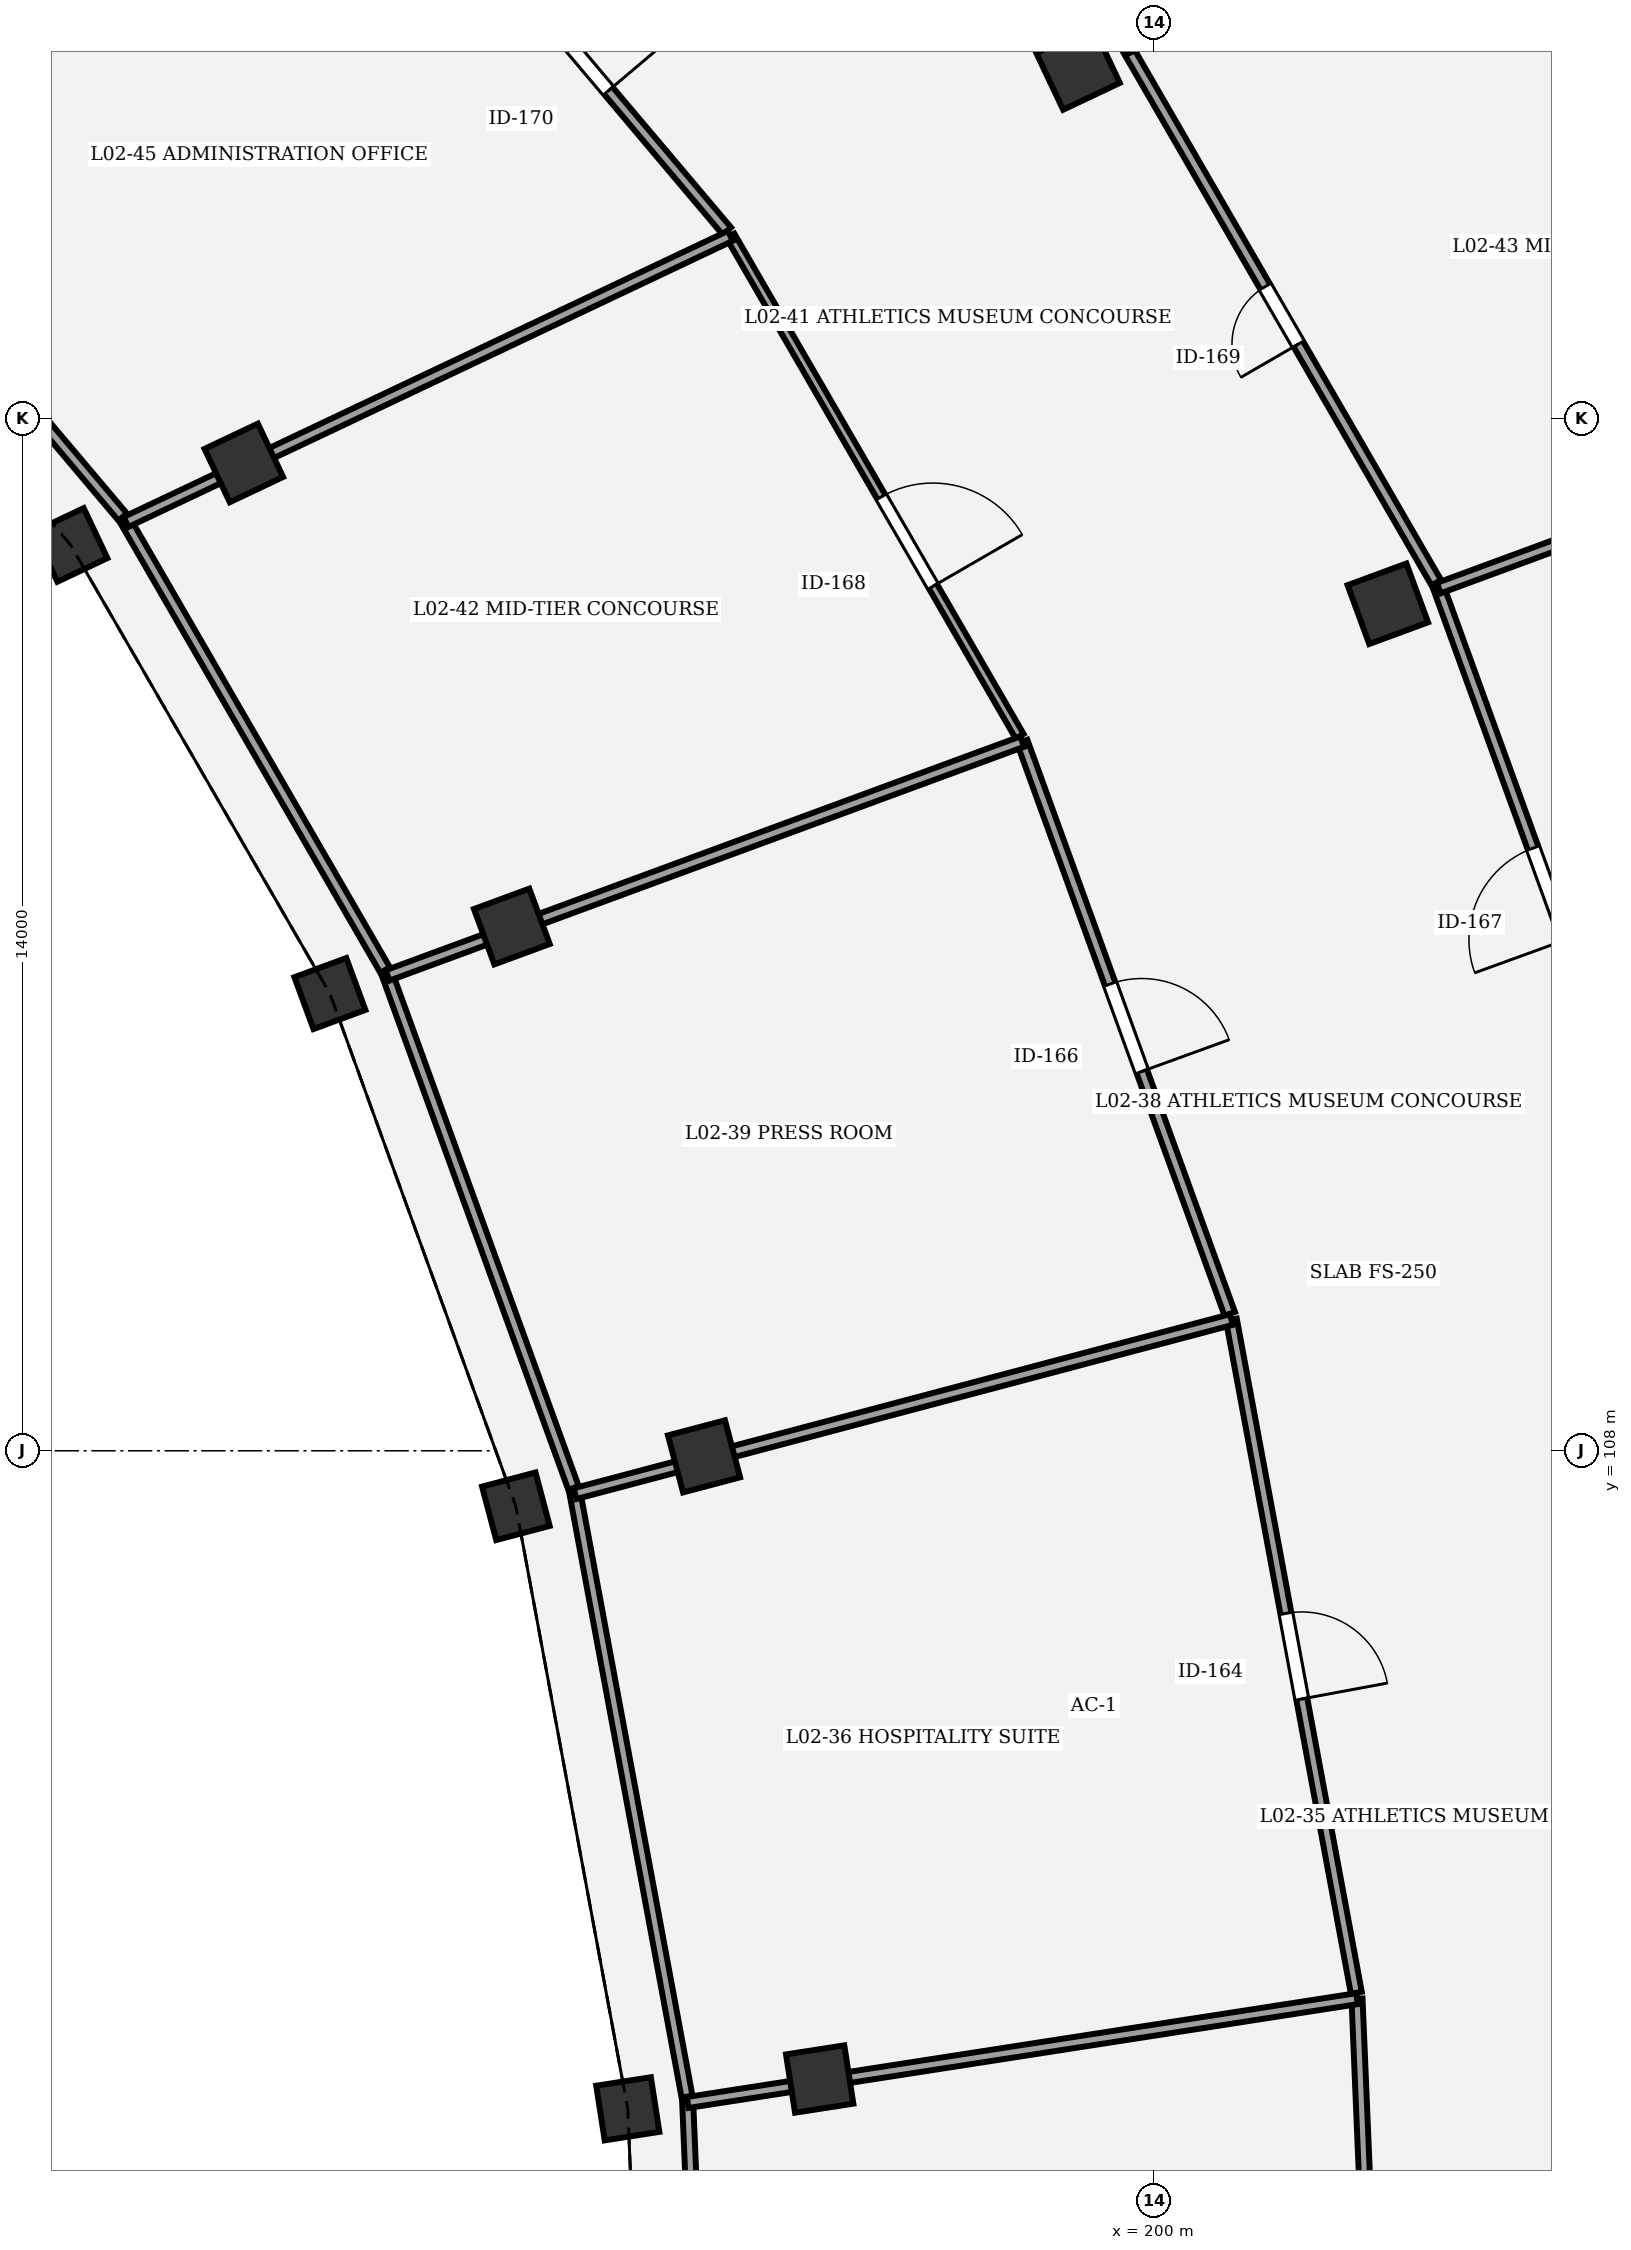
"""IFC4 building model, lengths in metres.
Left out: names, types, materials, properties, quantities, classifications, styles, units other than length and angle.
Written with IfcOpenShell. Run it as: python <this file> out.ifc"""

import sys

from ifc_helpers import new_model, si_unit, direction, frame, frame_2d, origin, origin_2d, place, context, subcontext, project, spatial, rectangle, extrude, element, fill, save


model = new_model("IFC4")
c1 = context("Model", 3, precision=1e-05, world=origin(), true_north=direction((0.0, 1.0)))
c2 = subcontext(c1, "Body", "Model", "MODEL_VIEW")
j1 = project(units=[si_unit("LENGTHUNIT", "METRE"), si_unit("PLANEANGLEUNIT", "RADIAN")], contexts=[c1])
p1 = place(None, origin())
s1 = spatial("IfcSite", under=j1, at=p1, CompositionType="ELEMENT")
p2 = place(p1, origin())
s2 = spatial("IfcBuilding", under=s1, at=p2, CompositionType="ELEMENT")
p3 = place(p2, frame((0.0, 0.0, 10.2)))
s3 = spatial("IfcBuildingStorey", under=s2, at=p3, CompositionType="ELEMENT", Elevation=10.2)
p4 = place(p3, frame((192.869, 99.078, 0.0), z_axis=(0.0, 0.0, 1.0), x_axis=(0.98817491911, 0.153330783737, 0.0)))
e1 = element("IfcColumn", 1, at=p4, inside=s3, PredefinedType="COLUMN", context=c2, shape_type="SweptSolid", body=[
    extrude(rectangle(XDim=0.75, YDim=0.75, at=origin_2d()), origin(), (0.0, 0.0, 1.0), 4.5),
])
p5 = place(p3, frame((195.471, 99.482, 0.0), z_axis=(0.0, 0.0, 1.0), x_axis=(0.98817491911, 0.153330783737, 0.0)))
e2 = element("IfcColumn", 2, at=p5, inside=s3, PredefinedType="COLUMN", context=c2, shape_type="SweptSolid", body=[
    extrude(rectangle(XDim=0.8, YDim=0.8, at=origin_2d()), origin(), (0.0, 0.0, 1.0), 4.5),
])
p6 = place(p3, frame((191.352, 107.248, 0.0), z_axis=(0.0, 0.0, 1.0), x_axis=(0.966600102017, 0.256289373133, 0.0)))
e3 = element("IfcColumn", 3, at=p6, inside=s3, PredefinedType="COLUMN", context=c2, shape_type="SweptSolid", body=[
    extrude(rectangle(XDim=0.75, YDim=0.75, at=origin_2d()), origin(), (0.0, 0.0, 1.0), 4.5),
])
p7 = place(p3, frame((193.903, 107.924, 0.0), z_axis=(0.0, 0.0, 1.0), x_axis=(0.966600102017, 0.256289373133, 0.0)))
e4 = element("IfcColumn", 4, at=p7, inside=s3, PredefinedType="COLUMN", context=c2, shape_type="SweptSolid", body=[
    extrude(rectangle(XDim=0.8, YDim=0.8, at=origin_2d()), origin(), (0.0, 0.0, 1.0), 4.5),
])
p8 = place(p3, frame((188.83, 114.199, 0.0), z_axis=(0.0, 0.0, 1.0), x_axis=(0.938372433776, 0.34562577382, 0.0)))
e5 = element("IfcColumn", 5, at=p8, inside=s3, PredefinedType="COLUMN", context=c2, shape_type="SweptSolid", body=[
    extrude(rectangle(XDim=0.75, YDim=0.75, at=origin_2d()), origin(), (0.0, 0.0, 1.0), 4.5),
])
p9 = place(p3, frame((191.297, 115.108, 0.0), z_axis=(0.0, 0.0, 1.0), x_axis=(0.938372433776, 0.34562577382, 0.0)))
e6 = element("IfcColumn", 6, at=p9, inside=s3, PredefinedType="COLUMN", context=c2, shape_type="SweptSolid", body=[
    extrude(rectangle(XDim=0.8, YDim=0.8, at=origin_2d()), origin(), (0.0, 0.0, 1.0), 4.5),
])
p10 = place(p3, frame((203.176, 119.484, 0.0), z_axis=(0.0, 0.0, 1.0), x_axis=(0.938372433776, 0.34562577382, 0.0)))
e7 = element("IfcColumn", 7, at=p10, inside=s3, PredefinedType="COLUMN", context=c2, shape_type="SweptSolid", body=[
    extrude(rectangle(XDim=0.85, YDim=0.85, at=origin_2d()), origin(), (0.0, 0.0, 1.0), 4.5),
])
p11 = place(p3, frame((185.313, 120.281, 0.0), z_axis=(0.0, 0.0, 1.0), x_axis=(0.903858661687, 0.4278311813, 0.0)))
e8 = element("IfcColumn", 8, at=p11, inside=s3, PredefinedType="COLUMN", context=c2, shape_type="SweptSolid", body=[
    extrude(rectangle(XDim=0.75, YDim=0.75, at=origin_2d()), origin(), (0.0, 0.0, 1.0), 4.5),
])
p12 = place(p3, frame((187.663, 121.394, 0.0), z_axis=(0.0, 0.0, 1.0), x_axis=(0.903858661687, 0.4278311813, 0.0)))
e9 = element("IfcColumn", 9, at=p12, inside=s3, PredefinedType="COLUMN", context=c2, shape_type="SweptSolid", body=[
    extrude(rectangle(XDim=0.8, YDim=0.8, at=origin_2d()), origin(), (0.0, 0.0, 1.0), 4.5),
])
p13 = place(p3, frame((198.976, 126.748, 0.0), z_axis=(0.0, 0.0, 1.0), x_axis=(0.903858661687, 0.4278311813, 0.0)))
e10 = element("IfcColumn", 10, at=p13, inside=s3, PredefinedType="COLUMN", context=c2, shape_type="SweptSolid", body=[
    extrude(rectangle(XDim=0.85, YDim=0.85, at=origin_2d()), origin(), (0.0, 0.0, 1.0), 4.5),
])
p14 = place(p3, frame((202.758, 100.571, 0.0), z_axis=(0.0, 0.0, 1.0), x_axis=(0.041894479342, -0.999122040894, 0.0)))
e11 = element("IfcWall", 11, at=p14, inside=s3, PredefinedType="PARTITIONING", context=c2, shape_type="SweptSolid", body=[
    extrude(rectangle(XDim=13.543, YDim=0.15, at=frame_2d((6.771, 0.0))), origin(), (0.0, 0.0, 1.0), 3.25),
])
p15 = place(p14, frame((6.202, 0.0, 0.0)))
e12 = element("IfcOpeningElement", 12, at=p15, cuts=e11, PredefinedType="OPENING", context=c2, shape_type="SweptSolid", body=[
    extrude(rectangle(XDim=1.14, YDim=2.2, at=frame_2d((0.57, 1.1))), frame((0.0, 0.085, 0.0), z_axis=(0.0, -1.0, 0.0), x_axis=(1.0, 0.0, 0.0)), (0.0, 0.0, 1.0), 0.17),
])
p16 = place(p3, frame((201.053, 109.779, 0.0), z_axis=(0.0, 0.0, 1.0), x_axis=(0.182600545941, -0.983187184936, 0.0)))
e13 = element("IfcWall", 13, at=p16, inside=s3, PredefinedType="PARTITIONING", context=c2, shape_type="SweptSolid", body=[
    extrude(rectangle(XDim=9.284, YDim=0.15, at=frame_2d((4.642, 0.0))), origin(), (0.0, 0.0, 1.0), 3.25),
])
p17 = place(p16, frame((4.052, 0.0, 0.0)))
e14 = element("IfcOpeningElement", 14, at=p17, cuts=e13, PredefinedType="OPENING", context=c2, shape_type="SweptSolid", body=[
    extrude(rectangle(XDim=1.18, YDim=2.2, at=frame_2d((0.59, 1.1))), frame((0.0, 0.085, 0.0), z_axis=(0.0, -1.0, 0.0), x_axis=(1.0, 0.0, 0.0)), (0.0, 0.0, 1.0), 0.17),
])
p18 = place(p3, frame((198.218, 117.615, 0.0), z_axis=(0.0, 0.0, 1.0), x_axis=(0.341044733968, -0.940047067669, 0.0)))
e15 = element("IfcWall", 15, at=p18, inside=s3, PredefinedType="PARTITIONING", context=c2, shape_type="SweptSolid", body=[
    extrude(rectangle(XDim=8.254, YDim=0.15, at=frame_2d((4.127, 0.0))), origin(), (0.0, 0.0, 1.0), 3.25),
])
p19 = place(p18, frame((3.497, 0.0, 0.0)))
e16 = element("IfcOpeningElement", 16, at=p19, cuts=e15, PredefinedType="OPENING", context=c2, shape_type="SweptSolid", body=[
    extrude(rectangle(XDim=1.26, YDim=2.2, at=frame_2d((0.63, 1.1))), frame((0.0, 0.085, 0.0), z_axis=(0.0, -1.0, 0.0), x_axis=(1.0, 0.0, 0.0)), (0.0, 0.0, 1.0), 0.17),
])
p20 = place(p3, frame((206.874, 111.405, 0.0), z_axis=(0.0, 0.0, 1.0), x_axis=(-0.341031741571, 0.940051781149, 0.0)))
e17 = element("IfcWall", 17, at=p20, inside=s3, PredefinedType="PARTITIONING", context=c2, shape_type="SweptSolid", body=[
    extrude(rectangle(XDim=8.82, YDim=0.15, at=frame_2d((4.41, 0.0))), origin(), (0.0, 0.0, 1.0), 3.25),
])
p21 = place(p20, frame((3.75, 0.0, 0.0)))
e18 = element("IfcOpeningElement", 18, at=p21, cuts=e17, PredefinedType="OPENING", context=c2, shape_type="SweptSolid", body=[
    extrude(rectangle(XDim=1.32, YDim=2.2, at=frame_2d((0.66, 1.1))), frame((0.0, 0.085, 0.0), z_axis=(0.0, -1.0, 0.0), x_axis=(1.0, 0.0, 0.0)), (0.0, 0.0, 1.0), 0.17),
])
p22 = place(p3, frame((194.26, 124.472, 0.0), z_axis=(0.0, 0.0, 1.0), x_axis=(0.500584301803, -0.865687794063, 0.0)))
e19 = element("IfcWall", 19, at=p22, inside=s3, PredefinedType="PARTITIONING", context=c2, shape_type="SweptSolid", body=[
    extrude(rectangle(XDim=7.837, YDim=0.125, at=frame_2d((3.918, 0.0))), origin(), (0.0, 0.0, 1.0), 3.25),
])
p23 = place(p22, frame((4.088, 0.0, 0.0)))
e20 = element("IfcOpeningElement", 20, at=p23, cuts=e19, PredefinedType="OPENING", context=c2, shape_type="SweptSolid", body=[
    extrude(rectangle(XDim=1.4, YDim=2.2, at=frame_2d((0.7, 1.1))), frame((0.0, 0.073, 0.0), z_axis=(0.0, -1.0, 0.0), x_axis=(1.0, 0.0, 0.0)), (0.0, 0.0, 1.0), 0.145),
])
p24 = place(p3, frame((203.833, 119.769, 0.0), z_axis=(0.0, 0.0, 1.0), x_axis=(-0.500559280672, 0.865702262059, 0.0)))
e21 = element("IfcWall", 21, at=p24, inside=s3, PredefinedType="PARTITIONING", context=c2, shape_type="SweptSolid", body=[
    extrude(rectangle(XDim=8.375, YDim=0.15, at=frame_2d((4.187, 0.0))), origin(), (0.0, 0.0, 1.0), 3.25),
])
p25 = place(p24, frame((3.737, 0.0, 0.0)))
e22 = element("IfcOpeningElement", 22, at=p25, cuts=e21, PredefinedType="OPENING", context=c2, shape_type="SweptSolid", body=[
    extrude(rectangle(XDim=0.9, YDim=2.3, at=frame_2d((0.45, 1.15))), frame((0.0, 0.085, 0.0), z_axis=(0.0, -1.0, 0.0), x_axis=(1.0, 0.0, 0.0)), (0.0, 0.0, 1.0), 0.17),
])
p26 = place(p3, frame((189.193, 130.482, 0.0), z_axis=(0.0, 0.0, 1.0), x_axis=(0.645180817826, -0.764029915847, 0.0)))
e23 = element("IfcWall", 23, at=p26, inside=s3, PredefinedType="PARTITIONING", context=c2, shape_type="SweptSolid", body=[
    extrude(rectangle(XDim=7.779, YDim=0.15, at=frame_2d((3.89, 0.0))), origin(), (0.0, 0.0, 1.0), 3.25),
])
p27 = place(p26, frame((4.35, 0.0, 0.0)))
e24 = element("IfcOpeningElement", 24, at=p27, cuts=e23, PredefinedType="OPENING", context=c2, shape_type="SweptSolid", body=[
    extrude(rectangle(XDim=0.94, YDim=2.3, at=frame_2d((0.47, 1.15))), frame((0.0, 0.085, 0.0), z_axis=(0.0, -1.0, 0.0), x_axis=(1.0, 0.0, 0.0)), (0.0, 0.0, 1.0), 0.17),
])
p28 = place(p3, frame((194.19, 87.04, 0.0), z_axis=(0.0, 0.0, 1.0), x_axis=(-0.041909219346, 0.999121422718, 0.0)))
e25 = element("IfcWall", 25, at=p28, inside=s3, PredefinedType="PARTITIONING", context=c2, shape_type="SweptSolid", body=[
    extrude(rectangle(XDim=12.135, YDim=0.15, at=frame_2d((6.067, 0.0))), origin(), (0.0, 0.0, 1.0), 3.25),
])
p29 = place(p3, frame((193.682, 99.164, 0.0), z_axis=(0.0, 0.0, 1.0), x_axis=(0.988188135357, 0.153245584407, 0.0)))
e26 = element("IfcWall", 26, at=p29, inside=s3, PredefinedType="PARTITIONING", context=c2, shape_type="SweptSolid", body=[
    extrude(rectangle(XDim=9.184, YDim=0.15, at=frame_2d((4.592, 0.0))), origin(), (0.0, 0.0, 1.0), 3.25),
])
p30 = place(p3, frame((193.673, 99.243, 0.0), z_axis=(0.0, 0.0, 1.0), x_axis=(-0.182614898171, 0.983184519287, 0.0)))
e27 = element("IfcWall", 27, at=p30, inside=s3, PredefinedType="PARTITIONING", context=c2, shape_type="SweptSolid", body=[
    extrude(rectangle(XDim=8.316, YDim=0.15, at=frame_2d((4.158, 0.0))), origin(), (0.0, 0.0, 1.0), 3.25),
])
p31 = place(p3, frame((192.154, 107.419, 0.0), z_axis=(0.0, 0.0, 1.0), x_axis=(0.96658744027, 0.256337122383, 0.0)))
e28 = element("IfcWall", 28, at=p31, inside=s3, PredefinedType="PARTITIONING", context=c2, shape_type="SweptSolid", body=[
    extrude(rectangle(XDim=9.207, YDim=0.15, at=frame_2d((4.604, 0.0))), origin(), (0.0, 0.0, 1.0), 3.25),
])
p32 = place(p3, frame((192.133, 107.496, 0.0), z_axis=(0.0, 0.0, 1.0), x_axis=(-0.34104817416, 0.940045819576, 0.0)))
e29 = element("IfcWall", 29, at=p32, inside=s3, PredefinedType="PARTITIONING", context=c2, shape_type="SweptSolid", body=[
    extrude(rectangle(XDim=7.392, YDim=0.15, at=frame_2d((3.696, 0.0))), origin(), (0.0, 0.0, 1.0), 3.25),
])
p33 = place(p3, frame((189.612, 114.445, 0.0), z_axis=(0.0, 0.0, 1.0), x_axis=(0.93834402583, 0.345702891496, 0.0)))
e30 = element("IfcWall", 30, at=p33, inside=s3, PredefinedType="PARTITIONING", context=c2, shape_type="SweptSolid", body=[
    extrude(rectangle(XDim=9.171, YDim=0.15, at=frame_2d((4.585, 0.0))), origin(), (0.0, 0.0, 1.0), 3.25),
])
p34 = place(p3, frame((203.866, 119.696, 0.0), z_axis=(0.0, 0.0, 1.0), x_axis=(0.938346807893, 0.345695340028, 0.0)))
e31 = element("IfcWall", 31, at=p34, inside=s3, PredefinedType="PARTITIONING", context=c2, shape_type="SweptSolid", body=[
    extrude(rectangle(XDim=7.905, YDim=0.15, at=frame_2d((3.952, 0.0))), origin(), (0.0, 0.0, 1.0), 3.25),
])
p35 = place(p3, frame((189.579, 114.518, 0.0), z_axis=(0.0, 0.0, 1.0), x_axis=(-0.500549390525, 0.865707980583, 0.0)))
e32 = element("IfcWall", 32, at=p35, inside=s3, PredefinedType="PARTITIONING", context=c2, shape_type="SweptSolid", body=[
    extrude(rectangle(XDim=7.018, YDim=0.15, at=frame_2d((3.509, 0.0))), origin(), (0.0, 0.0, 1.0), 3.25),
])
p36 = place(p3, frame((186.066, 120.594, 0.0), z_axis=(0.0, 0.0, 1.0), x_axis=(0.903860081227, 0.427828182292, 0.0)))
e33 = element("IfcWall", 33, at=p36, inside=s3, PredefinedType="PARTITIONING", context=c2, shape_type="SweptSolid", body=[
    extrude(rectangle(XDim=9.066, YDim=0.15, at=frame_2d((4.533, 0.0))), origin(), (0.0, 0.0, 1.0), 3.25),
])
p37 = place(p3, frame((199.641, 127.019, 0.0), z_axis=(0.0, 0.0, 1.0), x_axis=(0.903854859666, 0.427839213559, 0.0)))
e34 = element("IfcWall", 34, at=p37, inside=s3, PredefinedType="PARTITIONING", context=c2, shape_type="SweptSolid", body=[
    extrude(rectangle(XDim=7.814, YDim=0.15, at=frame_2d((3.907, 0.0))), origin(), (0.0, 0.0, 1.0), 3.25),
])
p38 = place(p3, frame((186.02, 120.66, 0.0), z_axis=(0.0, 0.0, 1.0), x_axis=(-0.64516899819, 0.764039896716, 0.0)))
e35 = element("IfcWall", 35, at=p38, inside=s3, PredefinedType="PARTITIONING", context=c2, shape_type="SweptSolid", body=[
    extrude(rectangle(XDim=6.967, YDim=0.15, at=frame_2d((3.483, 0.0))), origin(), (0.0, 0.0, 1.0), 3.25),
])
p39 = place(p3, frame((181.525, 125.983, 0.0), z_axis=(0.0, 0.0, 1.0), x_axis=(0.862518193496, 0.506026052579, 0.0)))
e36 = element("IfcWall", 36, at=p39, inside=s3, PredefinedType="PARTITIONING", context=c2, shape_type="SweptSolid", body=[
    extrude(rectangle(XDim=8.89, YDim=0.15, at=frame_2d((4.445, 0.0))), origin(), (0.0, 0.0, 1.0), 3.25),
])
p40 = place(p17, origin())
e37 = element("IfcDoor", 37, at=p40, inside=s3, OperationType="SINGLE_SWING_RIGHT", PredefinedType="DOOR", context=c2, shape_type="SweptSolid", body=[
    extrude(rectangle(XDim=1.18, YDim=2.2, at=frame_2d((0.59, 1.1))), frame((0.0, 0.025, 0.0), z_axis=(0.0, -1.0, 0.0), x_axis=(1.0, 0.0, 0.0)), (0.0, 0.0, 1.0), 0.05),
])
fill(e14, e37)
p41 = place(p19, origin())
e38 = element("IfcDoor", 38, at=p41, inside=s3, OperationType="SINGLE_SWING_RIGHT", PredefinedType="DOOR", context=c2, shape_type="SweptSolid", body=[
    extrude(rectangle(XDim=1.26, YDim=2.2, at=frame_2d((0.63, 1.1))), frame((0.0, 0.025, 0.0), z_axis=(0.0, -1.0, 0.0), x_axis=(1.0, 0.0, 0.0)), (0.0, 0.0, 1.0), 0.05),
])
fill(e16, e38)
p42 = place(p21, origin())
e39 = element("IfcDoor", 39, at=p42, inside=s3, OperationType="SINGLE_SWING_LEFT", PredefinedType="DOOR", context=c2, shape_type="SweptSolid", body=[
    extrude(rectangle(XDim=1.32, YDim=2.2, at=frame_2d((0.66, 1.1))), frame((0.0, 0.025, 0.0), z_axis=(0.0, -1.0, 0.0), x_axis=(1.0, 0.0, 0.0)), (0.0, 0.0, 1.0), 0.05),
])
fill(e18, e39)
p43 = place(p23, origin())
e40 = element("IfcDoor", 40, at=p43, inside=s3, OperationType="SINGLE_SWING_RIGHT", PredefinedType="DOOR", context=c2, shape_type="SweptSolid", body=[
    extrude(rectangle(XDim=1.4, YDim=2.2, at=frame_2d((0.7, 1.1))), frame((0.0, 0.025, 0.0), z_axis=(0.0, -1.0, 0.0), x_axis=(1.0, 0.0, 0.0)), (0.0, 0.0, 1.0), 0.05),
])
fill(e20, e40)
p44 = place(p25, origin())
e41 = element("IfcDoor", 41, at=p44, inside=s3, OperationType="SINGLE_SWING_LEFT", PredefinedType="DOOR", context=c2, shape_type="SweptSolid", body=[
    extrude(rectangle(XDim=0.9, YDim=2.3, at=frame_2d((0.45, 1.15))), frame((0.0, 0.025, 0.0), z_axis=(0.0, -1.0, 0.0), x_axis=(1.0, 0.0, 0.0)), (0.0, 0.0, 1.0), 0.05),
])
fill(e22, e41)
p45 = place(p27, origin())
e42 = element("IfcDoor", 42, at=p45, inside=s3, OperationType="SINGLE_SWING_RIGHT", PredefinedType="DOOR", context=c2, shape_type="SweptSolid", body=[
    extrude(rectangle(XDim=0.94, YDim=2.3, at=frame_2d((0.47, 1.15))), frame((0.0, 0.025, 0.0), z_axis=(0.0, -1.0, 0.0), x_axis=(1.0, 0.0, 0.0)), (0.0, 0.0, 1.0), 0.05),
])
fill(e24, e42)
save(model, sys.argv[1])
